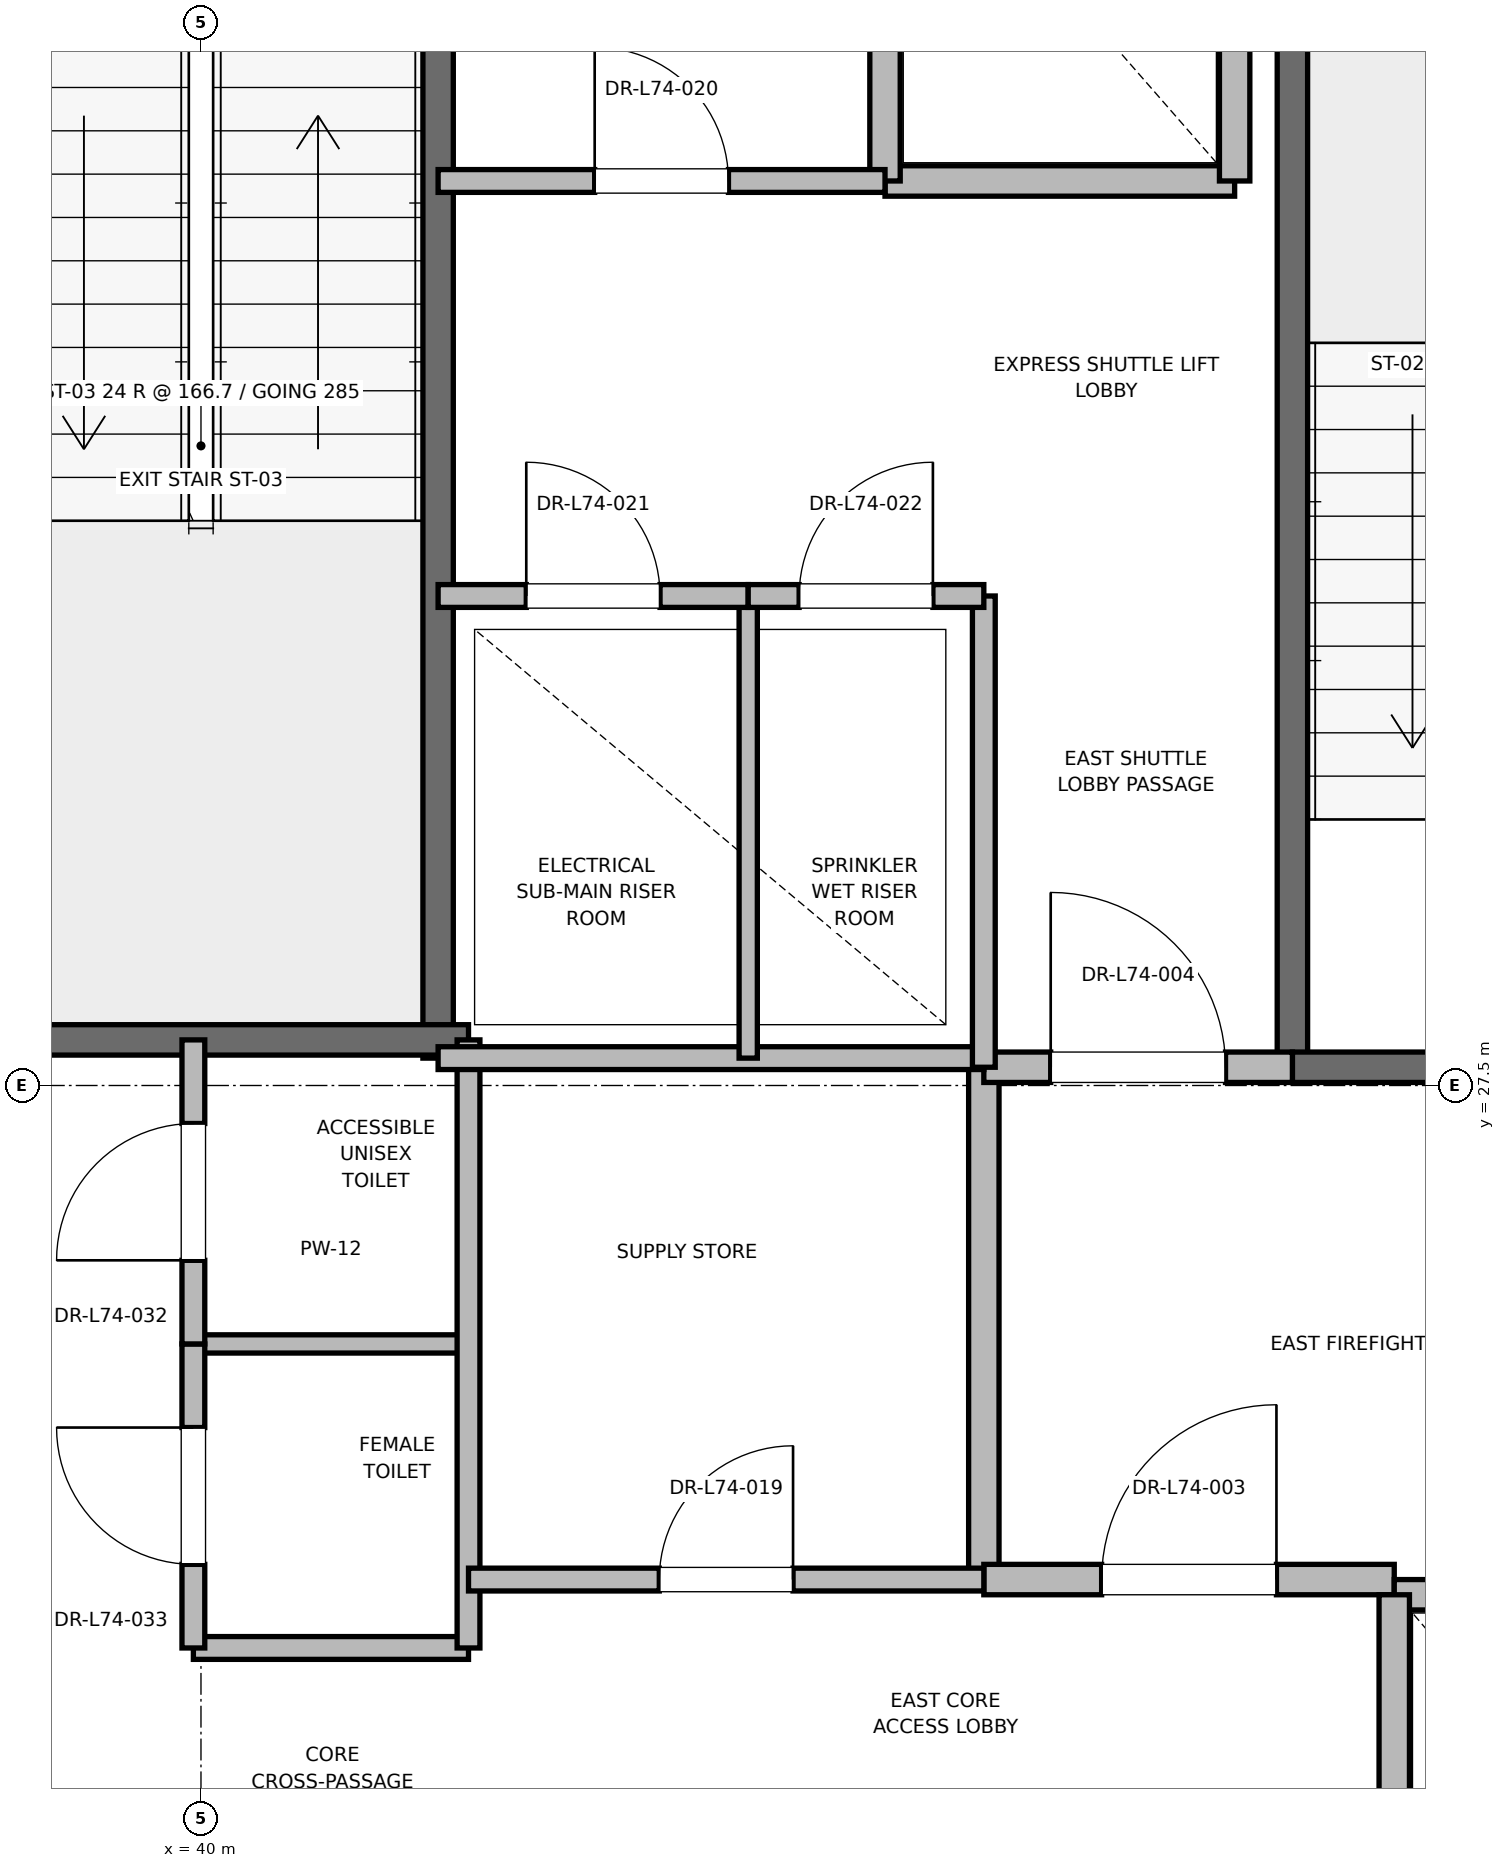
"""IFC4 building model, lengths in metres.
Left out: names, types, materials, properties, quantities, classifications, styles, units other than length and angle.
Written with IfcOpenShell. Run it as: python <this file> out.ifc"""

import sys

from ifc_helpers import new_model, si_unit, direction, frame, frame_2d, origin, place, context, subcontext, project, spatial, rectangle, extrude, element, fill, save


model = new_model("IFC4")
c1 = context("Model", 3, precision=1e-05, world=origin(), true_north=direction((0.0, 1.0)))
c2 = subcontext(c1, "Body", "Model", "MODEL_VIEW")
j1 = project(units=[si_unit("LENGTHUNIT", "METRE"), si_unit("PLANEANGLEUNIT", "RADIAN")], contexts=[c1])
p1 = place(None, origin())
s1 = spatial("IfcSite", under=j1, at=p1, CompositionType="ELEMENT")
p2 = place(p1, origin())
s2 = spatial("IfcBuilding", under=s1, at=p2, CompositionType="ELEMENT")
p3 = place(p2, frame((0.0, 0.0, 318.8)))
s3 = spatial("IfcBuildingStorey", under=s2, at=p3, CompositionType="ELEMENT", Elevation=318.8)
p4 = place(p3, frame((47.18, 27.62, 0.0), z_axis=(0.0, 0.0, 1.0), x_axis=(0.0, 1.0, 0.0)))
e1 = element("IfcWall", 1, at=p4, inside=s3, PredefinedType="SOLIDWALL", context=c2, shape_type="SweptSolid", body=[
    extrude(rectangle(XDim=8.18, YDim=0.2, at=frame_2d((4.09, 0.0))), origin(), (0.0, 0.0, 1.0), 3.785),
])
p5 = place(p3, frame((47.18, 27.62, 0.0), z_axis=(0.0, 0.0, 1.0), x_axis=(1.0, 0.0, 0.0)))
e2 = element("IfcWall", 2, at=p5, inside=s3, PredefinedType="SOLIDWALL", context=c2, shape_type="SweptSolid", body=[
    extrude(rectangle(XDim=3.12, YDim=0.2, at=frame_2d((1.56, 0.0))), origin(), (0.0, 0.0, 1.0), 3.785),
])
p6 = place(p5, frame((1.01, 0.0, 0.0)))
e3 = element("IfcOpeningElement", 3, at=p6, cuts=e2, PredefinedType="OPENING", context=c2, shape_type="SweptSolid", body=[
    extrude(rectangle(XDim=1.1, YDim=2.15, at=frame_2d((0.55, 1.075))), frame((0.0, 0.1, 0.0), z_axis=(0.0, -1.0, 0.0), x_axis=(1.0, 0.0, 0.0)), (0.0, 0.0, 1.0), 0.2),
])
p7 = place(p3, frame((41.56, 27.68, 0.0), z_axis=(0.0, 0.0, 1.0), x_axis=(0.0, 1.0, 0.0)))
e4 = element("IfcWall", 4, at=p7, inside=s3, PredefinedType="SOLIDWALL", context=c2, shape_type="SweptSolid", body=[
    extrude(rectangle(XDim=8.57, YDim=0.2, at=frame_2d((4.285, 0.0))), origin(), (0.0, 0.0, 1.0), 3.785),
])
p8 = place(p3, frame((38.44, 27.8, 0.0), z_axis=(0.0, 0.0, 1.0), x_axis=(1.0, 0.0, 0.0)))
e5 = element("IfcWall", 5, at=p8, inside=s3, PredefinedType="SOLIDWALL", context=c2, shape_type="SweptSolid", body=[
    extrude(rectangle(XDim=3.32, YDim=0.2, at=frame_2d((1.66, 0.0))), origin(), (0.0, 0.0, 1.0), 3.785),
])
p9 = place(p3, frame((45.15, 24.25, 0.0), z_axis=(0.0, 0.0, 1.0), x_axis=(0.0, 1.0, 0.0)))
e6 = element("IfcWall", 6, at=p9, inside=s3, PredefinedType="PARTITIONING", context=c2, shape_type="SweptSolid", body=[
    extrude(rectangle(XDim=3.37, YDim=0.2, at=frame_2d((1.685, 0.0))), origin(), (0.0, 0.0, 1.0), 3.785),
])
p10 = place(p3, frame((45.15, 24.25, 0.0), z_axis=(0.0, 0.0, 1.0), x_axis=(1.0, 0.0, 0.0)))
e7 = element("IfcWall", 7, at=p10, inside=s3, PredefinedType="PARTITIONING", context=c2, shape_type="SweptSolid", body=[
    extrude(rectangle(XDim=2.7, YDim=0.2, at=frame_2d((1.35, 0.0))), origin(), (0.0, 0.0, 1.0), 3.785),
])
p11 = place(p10, frame((0.775, 0.0, 0.0)))
e8 = element("IfcOpeningElement", 8, at=p11, cuts=e7, PredefinedType="OPENING", context=c2, shape_type="SweptSolid", body=[
    extrude(rectangle(XDim=1.15, YDim=2.2, at=frame_2d((0.575, 1.1))), frame((0.0, 0.1, 0.0), z_axis=(0.0, -1.0, 0.0), x_axis=(1.0, 0.0, 0.0)), (0.0, 0.0, 1.0), 0.2),
])
p12 = place(p3, frame((45.15, 27.62, 0.0), z_axis=(0.0, 0.0, 1.0), x_axis=(1.0, 0.0, 0.0)))
e9 = element("IfcWall", 9, at=p12, inside=s3, PredefinedType="PARTITIONING", context=c2, shape_type="SweptSolid", body=[
    extrude(rectangle(XDim=2.03, YDim=0.2, at=frame_2d((1.015, 0.0))), origin(), (0.0, 0.0, 1.0), 3.785),
])
p13 = place(p12, frame((0.44, 0.0, 0.0)))
e10 = element("IfcOpeningElement", 10, at=p13, cuts=e9, PredefinedType="OPENING", context=c2, shape_type="SweptSolid", body=[
    extrude(rectangle(XDim=1.15, YDim=2.2, at=frame_2d((0.575, 1.1))), frame((0.0, 0.1, 0.0), z_axis=(0.0, -1.0, 0.0), x_axis=(1.0, 0.0, 0.0)), (0.0, 0.0, 1.0), 0.2),
])
p14 = place(p3, frame((50.45, 24.15, 0.0), z_axis=(0.0, 0.0, 1.0), x_axis=(-1.0, 0.0, 0.0)))
e11 = element("IfcWall", 11, at=p14, inside=s3, PredefinedType="SOLIDWALL", context=c2, shape_type="SweptSolid", body=[
    extrude(rectangle(XDim=2.6, YDim=0.2, at=frame_2d((1.3, 0.0))), origin(), (0.0, 0.0, 1.0), 2.865),
])
p15 = place(p14, frame((0.75, 0.0, 0.0)))
e12 = element("IfcOpeningElement", 12, at=p15, cuts=e11, PredefinedType="OPENING", context=c2, shape_type="SweptSolid", body=[
    extrude(rectangle(XDim=1.1, YDim=2.2, at=frame_2d((0.55, 1.1))), frame((0.0, 0.1, 0.0), z_axis=(0.0, -1.0, 0.0), x_axis=(1.0, 0.0, 0.0)), (0.0, 0.0, 1.0), 0.2),
])
p16 = place(p3, frame((47.85, 24.15, 0.0), z_axis=(0.0, 0.0, 1.0), x_axis=(0.0, -1.0, 0.0)))
e13 = element("IfcWall", 13, at=p16, inside=s3, PredefinedType="SOLIDWALL", context=c2, shape_type="SweptSolid", body=[
    extrude(rectangle(XDim=3.0, YDim=0.2, at=frame_2d((1.5, 0.0))), origin(), (0.0, 0.0, 1.0), 3.785),
])
p17 = place(p3, frame((44.5, 33.45, 0.0), z_axis=(0.0, 0.0, 1.0), x_axis=(1.0, 0.0, 0.0)))
e14 = element("IfcWall", 14, at=p17, inside=s3, PredefinedType="SOLIDWALL", context=c2, shape_type="SweptSolid", body=[
    extrude(rectangle(XDim=2.3, YDim=0.2, at=frame_2d((1.15, 0.0))), origin(), (0.0, 0.0, 1.0), 3.785),
])
p18 = place(p3, frame((44.5, 36.05, 0.0), z_axis=(0.0, 0.0, 1.0), x_axis=(0.0, -1.0, 0.0)))
e15 = element("IfcWall", 15, at=p18, inside=s3, PredefinedType="SOLIDWALL", context=c2, shape_type="SweptSolid", body=[
    extrude(rectangle(XDim=2.6, YDim=0.2, at=frame_2d((1.3, 0.0))), origin(), (0.0, 0.0, 1.0), 2.865),
])
p19 = place(p3, frame((46.8, 33.45, 0.0), z_axis=(0.0, 0.0, 1.0), x_axis=(0.0, 1.0, 0.0)))
e16 = element("IfcWall", 16, at=p19, inside=s3, PredefinedType="SOLIDWALL", context=c2, shape_type="SweptSolid", body=[
    extrude(rectangle(XDim=2.6, YDim=0.2, at=frame_2d((1.3, 0.0))), origin(), (0.0, 0.0, 1.0), 3.785),
])
p20 = place(p3, frame((39.95, 23.8, 0.0), z_axis=(0.0, 0.0, 1.0), x_axis=(1.0, 0.0, 0.0)))
e17 = element("IfcWall", 17, at=p20, inside=s3, PredefinedType="PARTITIONING", context=c2, shape_type="SweptSolid", body=[
    extrude(rectangle(XDim=1.81, YDim=0.15, at=frame_2d((0.905, 0.0))), origin(), (0.0, 0.0, 1.0), 2.85),
])
p21 = place(p3, frame((39.95, 25.8, 0.0), z_axis=(0.0, 0.0, 1.0), x_axis=(1.0, 0.0, 0.0)))
e18 = element("IfcWall", 18, at=p21, inside=s3, PredefinedType="PARTITIONING", context=c2, shape_type="SweptSolid", body=[
    extrude(rectangle(XDim=1.81, YDim=0.12, at=frame_2d((0.905, 0.0))), origin(), (0.0, 0.0, 1.0), 2.85),
])
p22 = place(p3, frame((41.76, 23.8, 0.0), z_axis=(0.0, 0.0, 1.0), x_axis=(0.0, 1.0, 0.0)))
e19 = element("IfcWall", 19, at=p22, inside=s3, PredefinedType="PARTITIONING", context=c2, shape_type="SweptSolid", body=[
    extrude(rectangle(XDim=4.0, YDim=0.15, at=frame_2d((2.0, 0.0))), origin(), (0.0, 0.0, 1.0), 2.85),
])
p23 = place(p3, frame((39.95, 23.8, 0.0), z_axis=(0.0, 0.0, 1.0), x_axis=(0.0, 1.0, 0.0)))
e20 = element("IfcWall", 20, at=p23, inside=s3, PredefinedType="PARTITIONING", context=c2, shape_type="SweptSolid", body=[
    extrude(rectangle(XDim=2.0, YDim=0.15, at=frame_2d((1.0, 0.0))), origin(), (0.0, 0.0, 1.0), 2.85),
])
p24 = place(p23, frame((0.55, 0.0, 0.0)))
e21 = element("IfcOpeningElement", 21, at=p24, cuts=e20, PredefinedType="OPENING", context=c2, shape_type="SweptSolid", body=[
    extrude(rectangle(XDim=0.9, YDim=2.1, at=frame_2d((0.45, 1.05))), frame((0.0, 0.075, 0.0), z_axis=(0.0, -1.0, 0.0), x_axis=(1.0, 0.0, 0.0)), (0.0, 0.0, 1.0), 0.15),
])
p25 = place(p3, frame((39.95, 25.8, 0.0), z_axis=(0.0, 0.0, 1.0), x_axis=(0.0, 1.0, 0.0)))
e22 = element("IfcWall", 22, at=p25, inside=s3, PredefinedType="PARTITIONING", context=c2, shape_type="SweptSolid", body=[
    extrude(rectangle(XDim=2.0, YDim=0.15, at=frame_2d((1.0, 0.0))), origin(), (0.0, 0.0, 1.0), 2.85),
])
p26 = place(p25, frame((0.55, 0.0, 0.0)))
e23 = element("IfcOpeningElement", 23, at=p26, cuts=e22, PredefinedType="OPENING", context=c2, shape_type="SweptSolid", body=[
    extrude(rectangle(XDim=0.9, YDim=2.1, at=frame_2d((0.45, 1.05))), frame((0.0, 0.075, 0.0), z_axis=(0.0, -1.0, 0.0), x_axis=(1.0, 0.0, 0.0)), (0.0, 0.0, 1.0), 0.15),
])
p27 = place(p3, frame((41.56, 27.68, 0.0), z_axis=(0.0, 0.0, 1.0), x_axis=(1.0, 0.0, 0.0)))
e24 = element("IfcWall", 24, at=p27, inside=s3, PredefinedType="PARTITIONING", context=c2, shape_type="SweptSolid", body=[
    extrude(rectangle(XDim=3.59, YDim=0.15, at=frame_2d((1.795, 0.0))), origin(), (0.0, 0.0, 1.0), 2.85),
])
p28 = place(p3, frame((41.76, 24.25, 0.0), z_axis=(0.0, 0.0, 1.0), x_axis=(1.0, 0.0, 0.0)))
e25 = element("IfcWall", 25, at=p28, inside=s3, PredefinedType="PARTITIONING", context=c2, shape_type="SweptSolid", body=[
    extrude(rectangle(XDim=3.39, YDim=0.15, at=frame_2d((1.695, 0.0))), origin(), (0.0, 0.0, 1.0), 2.85),
])
p29 = place(p28, frame((1.255, 0.0, 0.0)))
e26 = element("IfcOpeningElement", 26, at=p29, cuts=e25, PredefinedType="OPENING", context=c2, shape_type="SweptSolid", body=[
    extrude(rectangle(XDim=0.88, YDim=2.1, at=frame_2d((0.44, 1.05))), frame((0.0, 0.075, 0.0), z_axis=(0.0, -1.0, 0.0), x_axis=(1.0, 0.0, 0.0)), (0.0, 0.0, 1.0), 0.15),
])
p30 = place(p3, frame((45.15, 27.62, 0.0), z_axis=(0.0, 0.0, 1.0), x_axis=(0.0, 1.0, 0.0)))
e27 = element("IfcWall", 27, at=p30, inside=s3, PredefinedType="PARTITIONING", context=c2, shape_type="SweptSolid", body=[
    extrude(rectangle(XDim=3.1, YDim=0.15, at=frame_2d((1.55, 0.0))), origin(), (0.0, 0.0, 1.0), 2.85),
])
p31 = place(p3, frame((43.6, 27.68, 0.0), z_axis=(0.0, 0.0, 1.0), x_axis=(0.0, 1.0, 0.0)))
e28 = element("IfcWall", 28, at=p31, inside=s3, PredefinedType="PARTITIONING", context=c2, shape_type="SweptSolid", body=[
    extrude(rectangle(XDim=3.04, YDim=0.12, at=frame_2d((1.52, 0.0))), origin(), (0.0, 0.0, 1.0), 2.85),
])
p32 = place(p3, frame((41.56, 30.72, 0.0), z_axis=(0.0, 0.0, 1.0), x_axis=(1.0, 0.0, 0.0)))
e29 = element("IfcWall", 29, at=p32, inside=s3, PredefinedType="PARTITIONING", context=c2, shape_type="SweptSolid", body=[
    extrude(rectangle(XDim=2.04, YDim=0.15, at=frame_2d((1.02, 0.0))), origin(), (0.0, 0.0, 1.0), 2.85),
])
p33 = place(p32, frame((0.58, 0.0, 0.0)))
e30 = element("IfcOpeningElement", 30, at=p33, cuts=e29, PredefinedType="OPENING", context=c2, shape_type="SweptSolid", body=[
    extrude(rectangle(XDim=0.88, YDim=2.1, at=frame_2d((0.44, 1.05))), frame((0.0, 0.075, 0.0), z_axis=(0.0, -1.0, 0.0), x_axis=(1.0, 0.0, 0.0)), (0.0, 0.0, 1.0), 0.15),
])
p34 = place(p3, frame((43.6, 30.72, 0.0), z_axis=(0.0, 0.0, 1.0), x_axis=(1.0, 0.0, 0.0)))
e31 = element("IfcWall", 31, at=p34, inside=s3, PredefinedType="PARTITIONING", context=c2, shape_type="SweptSolid", body=[
    extrude(rectangle(XDim=1.55, YDim=0.15, at=frame_2d((0.775, 0.0))), origin(), (0.0, 0.0, 1.0), 2.85),
])
p35 = place(p34, frame((0.335, 0.0, 0.0)))
e32 = element("IfcOpeningElement", 32, at=p35, cuts=e31, PredefinedType="OPENING", context=c2, shape_type="SweptSolid", body=[
    extrude(rectangle(XDim=0.88, YDim=2.1, at=frame_2d((0.44, 1.05))), frame((0.0, 0.075, 0.0), z_axis=(0.0, -1.0, 0.0), x_axis=(1.0, 0.0, 0.0)), (0.0, 0.0, 1.0), 0.15),
])
p36 = place(p3, frame((41.56, 33.45, 0.0), z_axis=(0.0, 0.0, 1.0), x_axis=(1.0, 0.0, 0.0)))
e33 = element("IfcWall", 33, at=p36, inside=s3, PredefinedType="PARTITIONING", context=c2, shape_type="SweptSolid", body=[
    extrude(rectangle(XDim=2.94, YDim=0.15, at=frame_2d((1.47, 0.0))), origin(), (0.0, 0.0, 1.0), 2.85),
])
p37 = place(p36, frame((1.03, 0.0, 0.0)))
e34 = element("IfcOpeningElement", 34, at=p37, cuts=e33, PredefinedType="OPENING", context=c2, shape_type="SweptSolid", body=[
    extrude(rectangle(XDim=0.88, YDim=2.1, at=frame_2d((0.44, 1.05))), frame((0.0, 0.075, 0.0), z_axis=(0.0, -1.0, 0.0), x_axis=(1.0, 0.0, 0.0)), (0.0, 0.0, 1.0), 0.15),
])
p38 = place(p11, origin())
e35 = element("IfcDoor", 35, at=p38, inside=s3, OperationType="SINGLE_SWING_RIGHT", PredefinedType="DOOR", context=c2, shape_type="SweptSolid", body=[
    extrude(rectangle(XDim=1.15, YDim=2.2, at=frame_2d((0.575, 1.1))), frame((0.0, 0.025, 0.0), z_axis=(0.0, -1.0, 0.0), x_axis=(1.0, 0.0, 0.0)), (0.0, 0.0, 1.0), 0.05),
])
fill(e8, e35)
p39 = place(p13, origin())
e36 = element("IfcDoor", 36, at=p39, inside=s3, OperationType="SINGLE_SWING_LEFT", PredefinedType="DOOR", context=c2, shape_type="SweptSolid", body=[
    extrude(rectangle(XDim=1.15, YDim=2.2, at=frame_2d((0.575, 1.1))), frame((0.0, 0.025, 0.0), z_axis=(0.0, -1.0, 0.0), x_axis=(1.0, 0.0, 0.0)), (0.0, 0.0, 1.0), 0.05),
])
fill(e10, e36)
p40 = place(p24, origin())
e37 = element("IfcDoor", 37, at=p40, inside=s3, OperationType="SINGLE_SWING_RIGHT", PredefinedType="DOOR", context=c2, shape_type="SweptSolid", body=[
    extrude(rectangle(XDim=0.9, YDim=2.1, at=frame_2d((0.45, 1.05))), frame((0.0, 0.025, 0.0), z_axis=(0.0, -1.0, 0.0), x_axis=(1.0, 0.0, 0.0)), (0.0, 0.0, 1.0), 0.05),
])
fill(e21, e37)
p41 = place(p26, origin())
e38 = element("IfcDoor", 38, at=p41, inside=s3, OperationType="SINGLE_SWING_LEFT", PredefinedType="DOOR", context=c2, shape_type="SweptSolid", body=[
    extrude(rectangle(XDim=0.9, YDim=2.1, at=frame_2d((0.45, 1.05))), frame((0.0, 0.025, 0.0), z_axis=(0.0, -1.0, 0.0), x_axis=(1.0, 0.0, 0.0)), (0.0, 0.0, 1.0), 0.05),
])
fill(e23, e38)
p42 = place(p29, origin())
e39 = element("IfcDoor", 39, at=p42, inside=s3, OperationType="SINGLE_SWING_RIGHT", PredefinedType="DOOR", context=c2, shape_type="SweptSolid", body=[
    extrude(rectangle(XDim=0.88, YDim=2.1, at=frame_2d((0.44, 1.05))), frame((0.0, 0.025, 0.0), z_axis=(0.0, -1.0, 0.0), x_axis=(1.0, 0.0, 0.0)), (0.0, 0.0, 1.0), 0.05),
])
fill(e26, e39)
p43 = place(p33, origin())
e40 = element("IfcDoor", 40, at=p43, inside=s3, OperationType="SINGLE_SWING_LEFT", PredefinedType="DOOR", context=c2, shape_type="SweptSolid", body=[
    extrude(rectangle(XDim=0.88, YDim=2.1, at=frame_2d((0.44, 1.05))), frame((0.0, 0.025, 0.0), z_axis=(0.0, -1.0, 0.0), x_axis=(1.0, 0.0, 0.0)), (0.0, 0.0, 1.0), 0.05),
])
fill(e30, e40)
p44 = place(p35, origin())
e41 = element("IfcDoor", 41, at=p44, inside=s3, OperationType="SINGLE_SWING_RIGHT", PredefinedType="DOOR", context=c2, shape_type="SweptSolid", body=[
    extrude(rectangle(XDim=0.88, YDim=2.1, at=frame_2d((0.44, 1.05))), frame((0.0, 0.025, 0.0), z_axis=(0.0, -1.0, 0.0), x_axis=(1.0, 0.0, 0.0)), (0.0, 0.0, 1.0), 0.05),
])
fill(e32, e41)
p45 = place(p37, origin())
e42 = element("IfcDoor", 42, at=p45, inside=s3, OperationType="SINGLE_SWING_LEFT", PredefinedType="DOOR", context=c2, shape_type="SweptSolid", body=[
    extrude(rectangle(XDim=0.88, YDim=2.1, at=frame_2d((0.44, 1.05))), frame((0.0, 0.025, 0.0), z_axis=(0.0, -1.0, 0.0), x_axis=(1.0, 0.0, 0.0)), (0.0, 0.0, 1.0), 0.05),
])
fill(e34, e42)
save(model, sys.argv[1])
